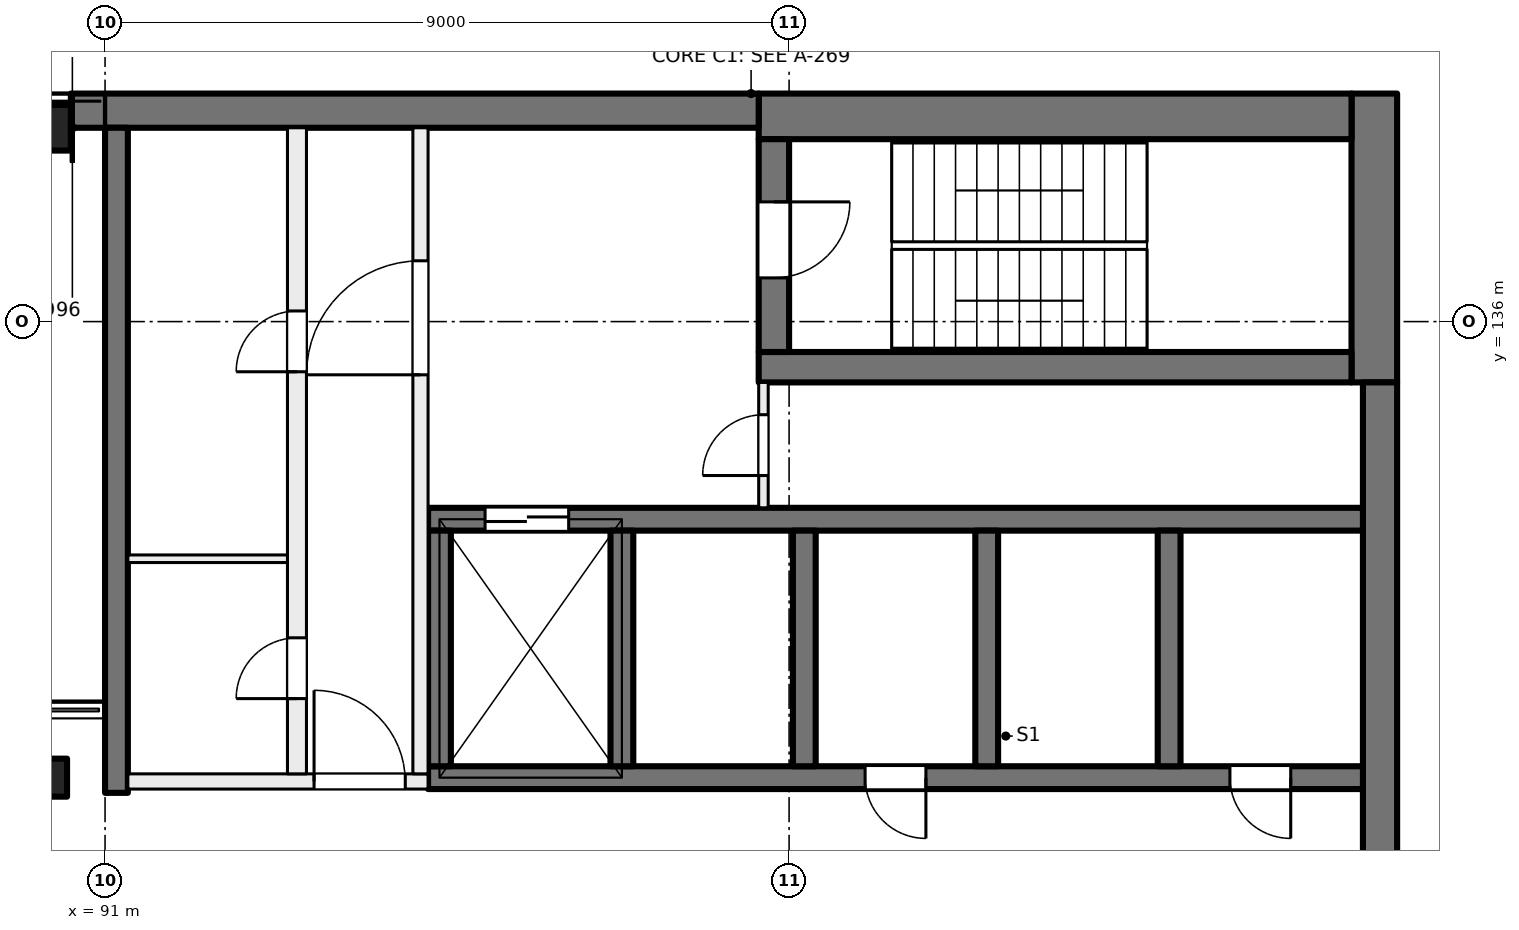
"""IFC4 building model, lengths in metres.
Left out: names, types, materials, properties, quantities, classifications, styles, units other than length and angle.
Written with IfcOpenShell. Run it as: python <this file> out.ifc"""

import sys

from ifc_helpers import new_model, si_unit, direction, frame, frame_2d, origin, origin_2d, place, context, subcontext, project, spatial, rectangle, extrude, element, fill, save


model = new_model("IFC4")
c1 = context("Model", 3, precision=1e-05, world=origin(), true_north=direction((0.0, 1.0)))
c2 = subcontext(c1, "Body", "Model", "MODEL_VIEW")
j1 = project(units=[si_unit("LENGTHUNIT", "METRE"), si_unit("PLANEANGLEUNIT", "RADIAN")], contexts=[c1])
p1 = place(None, origin())
s1 = spatial("IfcSite", under=j1, at=p1, CompositionType="ELEMENT")
p2 = place(p1, origin())
s2 = spatial("IfcBuilding", under=s1, at=p2, CompositionType="ELEMENT")
p3 = place(p2, frame((0.0, 0.0, 277.5)))
s3 = spatial("IfcBuildingStorey", under=s2, at=p3, CompositionType="ELEMENT", Elevation=277.5)
p4 = place(p3, frame((90.25, 130.0, 0.0), z_axis=(0.0, 0.0, 1.0), x_axis=(1.0, 0.0, 0.0)))
e1 = element("IfcColumn", 1, at=p4, inside=s3, PredefinedType="COLUMN", context=c2, shape_type="SweptSolid", body=[
    extrude(rectangle(XDim=0.5, YDim=0.5, at=origin_2d()), origin(), (0.0, 0.0, 1.0), 4.5),
])
p5 = place(p3, frame((90.25, 138.55, 0.0), z_axis=(0.0, 0.0, 1.0), x_axis=(1.0, 0.0, 0.0)))
e2 = element("IfcColumn", 2, at=p5, inside=s3, PredefinedType="COLUMN", context=c2, shape_type="SweptSolid", body=[
    extrude(rectangle(XDim=0.6, YDim=0.6, at=origin_2d()), origin(), (0.0, 0.0, 1.0), 4.5),
])
p6 = place(p3, frame((107.7, 139.0, 0.0), z_axis=(0.0, 0.0, 1.0), x_axis=(0.0, -1.0, 0.0)))
e3 = element("IfcWall", 3, at=p6, inside=s3, PredefinedType="SHEAR", context=c2, shape_type="SweptSolid", body=[
    extrude(rectangle(XDim=3.8, YDim=0.6, at=frame_2d((1.9, 0.0))), origin(), (0.0, 0.0, 1.0), 4.5),
])
p7 = place(p3, frame((107.775, 135.2, 0.0), z_axis=(0.0, 0.0, 1.0), x_axis=(0.0, -1.0, 0.0)))
e4 = element("IfcWall", 4, at=p7, inside=s3, PredefinedType="SHEAR", context=c2, shape_type="SweptSolid", body=[
    extrude(rectangle(XDim=14.4, YDim=0.45, at=frame_2d((7.2, 0.0))), origin(), (0.0, 0.0, 1.0), 4.5),
])
p8 = place(p3, frame((107.4, 138.7, 0.0), z_axis=(0.0, 0.0, 1.0), x_axis=(-1.0, 0.0, 0.0)))
e5 = element("IfcWall", 5, at=p8, inside=s3, PredefinedType="SHEAR", context=c2, shape_type="SweptSolid", body=[
    extrude(rectangle(XDim=7.8, YDim=0.6, at=frame_2d((3.9, 0.0))), origin(), (0.0, 0.0, 1.0), 4.5),
])
p9 = place(p3, frame((99.6, 138.775, 0.0), z_axis=(0.0, 0.0, 1.0), x_axis=(-1.0, 0.0, 0.0)))
e6 = element("IfcWall", 6, at=p9, inside=s3, PredefinedType="SHEAR", context=c2, shape_type="SweptSolid", body=[
    extrude(rectangle(XDim=9.05, YDim=0.45, at=frame_2d((4.525, 0.0))), origin(), (0.0, 0.0, 1.0), 4.5),
])
p10 = place(p3, frame((107.4, 135.4, 0.0), z_axis=(0.0, 0.0, 1.0), x_axis=(-1.0, 0.0, 0.0)))
e7 = element("IfcWall", 7, at=p10, inside=s3, PredefinedType="SHEAR", context=c2, shape_type="SweptSolid", body=[
    extrude(rectangle(XDim=7.8, YDim=0.4, at=frame_2d((3.9, 0.0))), origin(), (0.0, 0.0, 1.0), 4.5),
])
p11 = place(p3, frame((99.8, 138.4, 0.0), z_axis=(0.0, 0.0, 1.0), x_axis=(0.0, -1.0, 0.0)))
e8 = element("IfcWall", 8, at=p11, inside=s3, PredefinedType="SHEAR", context=c2, shape_type="SweptSolid", body=[
    extrude(rectangle(XDim=2.8, YDim=0.4, at=frame_2d((1.4, 0.0))), origin(), (0.0, 0.0, 1.0), 4.5),
])
p12 = place(p11, frame((0.825, 0.0, 0.0)))
e9 = element("IfcOpeningElement", 9, at=p12, cuts=e8, PredefinedType="OPENING", context=c2, shape_type="SweptSolid", body=[
    extrude(rectangle(XDim=1.0, YDim=2.1, at=frame_2d((0.5, 1.05))), frame((0.0, 0.21, 0.0), z_axis=(0.0, -1.0, 0.0), x_axis=(1.0, 0.0, 0.0)), (0.0, 0.0, 1.0), 0.42),
])
p13 = place(p3, frame((107.55, 130.0, 0.0), z_axis=(0.0, 0.0, 1.0), x_axis=(-1.0, 0.0, 0.0)))
e10 = element("IfcWall", 10, at=p13, inside=s3, PredefinedType="SHEAR", context=c2, shape_type="SweptSolid", body=[
    extrude(rectangle(XDim=12.3, YDim=0.3, at=frame_2d((6.15, 0.0))), origin(), (0.0, 0.0, 1.0), 4.5),
])
p14 = place(p13, frame((0.95, 0.0, 0.0)))
e11 = element("IfcOpeningElement", 11, at=p14, cuts=e10, PredefinedType="OPENING", context=c2, shape_type="SweptSolid", body=[
    extrude(rectangle(XDim=0.8, YDim=2.1, at=frame_2d((0.4, 1.05))), frame((0.0, 0.16, 0.0), z_axis=(0.0, -1.0, 0.0), x_axis=(1.0, 0.0, 0.0)), (0.0, 0.0, 1.0), 0.32),
])
p15 = place(p13, frame((5.75, 0.0, 0.0)))
e12 = element("IfcOpeningElement", 12, at=p15, cuts=e10, PredefinedType="OPENING", context=c2, shape_type="SweptSolid", body=[
    extrude(rectangle(XDim=0.8, YDim=2.1, at=frame_2d((0.4, 1.05))), frame((0.0, 0.16, 0.0), z_axis=(0.0, -1.0, 0.0), x_axis=(1.0, 0.0, 0.0)), (0.0, 0.0, 1.0), 0.32),
])
p16 = place(p3, frame((107.55, 133.4, 0.0), z_axis=(0.0, 0.0, 1.0), x_axis=(-1.0, 0.0, 0.0)))
e13 = element("IfcWall", 13, at=p16, inside=s3, PredefinedType="SHEAR", context=c2, shape_type="SweptSolid", body=[
    extrude(rectangle(XDim=12.3, YDim=0.3, at=frame_2d((6.15, 0.0))), origin(), (0.0, 0.0, 1.0), 4.5),
])
p17 = place(p16, frame((10.45, 0.0, 0.0)))
e14 = element("IfcOpeningElement", 14, at=p17, cuts=e13, PredefinedType="OPENING", context=c2, shape_type="SweptSolid", body=[
    extrude(rectangle(XDim=1.1, YDim=2.1, at=frame_2d((0.55, 1.05))), frame((0.0, 0.16, 0.0), z_axis=(0.0, -1.0, 0.0), x_axis=(1.0, 0.0, 0.0)), (0.0, 0.0, 1.0), 0.32),
])
for number, where, z_axis, x_axis in (
    (15, (105.0, 133.25, 0.0), (0.0, 0.0, 1.0), (0.0, -1.0, 0.0)),
    (16, (102.6, 133.25, 0.0), (0.0, 0.0, 1.0), (0.0, -1.0, 0.0)),
    (17, (100.2, 133.25, 0.0), (0.0, 0.0, 1.0), (0.0, -1.0, 0.0)),
    (18, (97.8, 133.25, 0.0), (0.0, 0.0, 1.0), (0.0, -1.0, 0.0)),
    (19, (95.4, 133.25, 0.0), (0.0, 0.0, 1.0), (0.0, -1.0, 0.0)),
):
    element("IfcWall", number, at=place(p3, frame(where, z_axis=z_axis, x_axis=x_axis)), inside=s3, PredefinedType="SHEAR", context=c2, shape_type="SweptSolid", body=[
        extrude(rectangle(XDim=3.1, YDim=0.3, at=frame_2d((1.55, 0.0))), origin(), (0.0, 0.0, 1.0), 4.5),
    ])
p18 = place(p3, frame((91.15, 138.55, 0.0), z_axis=(0.0, 0.0, 1.0), x_axis=(0.0, -1.0, 0.0)))
e20 = element("IfcWall", 20, at=p18, inside=s3, PredefinedType="SHEAR", context=c2, shape_type="SweptSolid", body=[
    extrude(rectangle(XDim=8.75, YDim=0.3, at=frame_2d((4.375, 0.0))), origin(), (0.0, 0.0, 1.0), 4.5),
])
p19 = place(p3, frame((91.3, 129.95, 0.0), z_axis=(0.0, 0.0, 1.0), x_axis=(1.0, 0.0, 0.0)))
e21 = element("IfcWall", 21, at=p19, inside=s3, PredefinedType="PARTITIONING", context=c2, shape_type="SweptSolid", body=[
    extrude(rectangle(XDim=3.95, YDim=0.2, at=frame_2d((1.975, 0.0))), origin(), (0.0, 0.0, 1.0), 4.125),
])
p20 = place(p19, frame((2.45, 0.0, 0.0)))
e22 = element("IfcOpeningElement", 22, at=p20, cuts=e21, PredefinedType="OPENING", context=c2, shape_type="SweptSolid", body=[
    extrude(rectangle(XDim=1.2, YDim=2.1, at=frame_2d((0.6, 1.05))), frame((0.0, 0.11, 0.0), z_axis=(0.0, -1.0, 0.0), x_axis=(1.0, 0.0, 0.0)), (0.0, 0.0, 1.0), 0.22),
])
p21 = place(p3, frame((95.15, 130.05, 0.0), z_axis=(0.0, 0.0, 1.0), x_axis=(0.0, 1.0, 0.0)))
e23 = element("IfcWall", 23, at=p21, inside=s3, PredefinedType="PARTITIONING", context=c2, shape_type="SweptSolid", body=[
    extrude(rectangle(XDim=8.5, YDim=0.2, at=frame_2d((4.25, 0.0))), origin(), (0.0, 0.0, 1.0), 4.125),
])
p22 = place(p21, frame((5.25, 0.0, 0.0)))
e24 = element("IfcOpeningElement", 24, at=p22, cuts=e23, PredefinedType="OPENING", context=c2, shape_type="SweptSolid", body=[
    extrude(rectangle(XDim=1.5, YDim=2.1, at=frame_2d((0.75, 1.05))), frame((0.0, 0.11, 0.0), z_axis=(0.0, -1.0, 0.0), x_axis=(1.0, 0.0, 0.0)), (0.0, 0.0, 1.0), 0.22),
])
p23 = place(p3, frame((93.525, 130.05, 0.0), z_axis=(0.0, 0.0, 1.0), x_axis=(0.0, 1.0, 0.0)))
e25 = element("IfcWall", 25, at=p23, inside=s3, PredefinedType="PARTITIONING", context=c2, shape_type="SweptSolid", body=[
    extrude(rectangle(XDim=8.5, YDim=0.25, at=frame_2d((4.25, 0.0))), origin(), (0.0, 0.0, 1.0), 4.125),
])
p24 = place(p23, frame((0.99, 0.0, 0.0)))
e26 = element("IfcOpeningElement", 26, at=p24, cuts=e25, PredefinedType="OPENING", context=c2, shape_type="SweptSolid", body=[
    extrude(rectangle(XDim=0.8, YDim=2.1, at=frame_2d((0.4, 1.05))), frame((0.0, 0.135, 0.0), z_axis=(0.0, -1.0, 0.0), x_axis=(1.0, 0.0, 0.0)), (0.0, 0.0, 1.0), 0.27),
])
p25 = place(p23, frame((5.29, 0.0, 0.0)))
e27 = element("IfcOpeningElement", 27, at=p25, cuts=e25, PredefinedType="OPENING", context=c2, shape_type="SweptSolid", body=[
    extrude(rectangle(XDim=0.8, YDim=2.1, at=frame_2d((0.4, 1.05))), frame((0.0, 0.135, 0.0), z_axis=(0.0, -1.0, 0.0), x_axis=(1.0, 0.0, 0.0)), (0.0, 0.0, 1.0), 0.27),
])
p26 = place(p3, frame((99.663, 133.55, 0.0), z_axis=(0.0, 0.0, 1.0), x_axis=(0.0, 1.0, 0.0)))
e28 = element("IfcWall", 28, at=p26, inside=s3, PredefinedType="PARTITIONING", context=c2, shape_type="SweptSolid", body=[
    extrude(rectangle(XDim=1.65, YDim=0.125, at=frame_2d((0.825, 0.0))), origin(), (0.0, 0.0, 1.0), 4.125),
])
p27 = place(p26, frame((0.425, 0.0, 0.0)))
e29 = element("IfcOpeningElement", 29, at=p27, cuts=e28, PredefinedType="OPENING", context=c2, shape_type="SweptSolid", body=[
    extrude(rectangle(XDim=0.8, YDim=2.1, at=frame_2d((0.4, 1.05))), frame((0.0, 0.073, 0.0), z_axis=(0.0, -1.0, 0.0), x_axis=(1.0, 0.0, 0.0)), (0.0, 0.0, 1.0), 0.145),
])
p28 = place(p3, frame((91.3, 132.88, 0.0), z_axis=(0.0, 0.0, 1.0), x_axis=(1.0, 0.0, 0.0)))
e30 = element("IfcWall", 30, at=p28, inside=s3, PredefinedType="PARTITIONING", context=c2, shape_type="SweptSolid", body=[
    extrude(rectangle(XDim=2.1, YDim=0.1, at=frame_2d((1.05, 0.0))), origin(), (0.0, 0.0, 1.0), 4.125),
])
p29 = place(p14, origin())
e31 = element("IfcDoor", 31, at=p29, inside=s3, OperationType="SINGLE_SWING_LEFT", PredefinedType="DOOR", context=c2, shape_type="SweptSolid", body=[
    extrude(rectangle(XDim=0.8, YDim=2.1, at=frame_2d((0.4, 1.05))), frame((0.0, 0.025, 0.0), z_axis=(0.0, -1.0, 0.0), x_axis=(1.0, 0.0, 0.0)), (0.0, 0.0, 1.0), 0.05),
])
fill(e11, e31)
p30 = place(p15, origin())
e32 = element("IfcDoor", 32, at=p30, inside=s3, OperationType="SINGLE_SWING_RIGHT", PredefinedType="DOOR", context=c2, shape_type="SweptSolid", body=[
    extrude(rectangle(XDim=0.8, YDim=2.1, at=frame_2d((0.4, 1.05))), frame((0.0, 0.025, 0.0), z_axis=(0.0, -1.0, 0.0), x_axis=(1.0, 0.0, 0.0)), (0.0, 0.0, 1.0), 0.05),
])
fill(e12, e32)
p31 = place(p20, origin())
e33 = element("IfcDoor", 33, at=p31, inside=s3, OperationType="DOUBLE_DOOR_SINGLE_SWING", PredefinedType="DOOR", context=c2, shape_type="SweptSolid", body=[
    extrude(rectangle(XDim=1.2, YDim=2.1, at=frame_2d((0.6, 1.05))), frame((0.0, 0.025, 0.0), z_axis=(0.0, -1.0, 0.0), x_axis=(1.0, 0.0, 0.0)), (0.0, 0.0, 1.0), 0.05),
])
fill(e22, e33)
p32 = place(p22, origin())
e34 = element("IfcDoor", 34, at=p32, inside=s3, OperationType="DOUBLE_DOOR_SINGLE_SWING", PredefinedType="DOOR", context=c2, shape_type="SweptSolid", body=[
    extrude(rectangle(XDim=1.5, YDim=2.1, at=frame_2d((0.75, 1.05))), frame((0.0, 0.025, 0.0), z_axis=(0.0, -1.0, 0.0), x_axis=(1.0, 0.0, 0.0)), (0.0, 0.0, 1.0), 0.05),
])
fill(e24, e34)
p33 = place(p12, origin())
e35 = element("IfcDoor", 35, at=p33, inside=s3, OperationType="SINGLE_SWING_RIGHT", PredefinedType="DOOR", context=c2, shape_type="SweptSolid", body=[
    extrude(rectangle(XDim=1.0, YDim=2.1, at=frame_2d((0.5, 1.05))), frame((0.0, 0.025, 0.0), z_axis=(0.0, -1.0, 0.0), x_axis=(1.0, 0.0, 0.0)), (0.0, 0.0, 1.0), 0.05),
])
fill(e9, e35)
p34 = place(p27, origin())
e36 = element("IfcDoor", 36, at=p34, inside=s3, OperationType="SINGLE_SWING_LEFT", PredefinedType="DOOR", context=c2, shape_type="SweptSolid", body=[
    extrude(rectangle(XDim=0.8, YDim=2.1, at=frame_2d((0.4, 1.05))), frame((0.0, 0.025, 0.0), z_axis=(0.0, -1.0, 0.0), x_axis=(1.0, 0.0, 0.0)), (0.0, 0.0, 1.0), 0.05),
])
fill(e29, e36)
p35 = place(p24, origin())
e37 = element("IfcDoor", 37, at=p35, inside=s3, OperationType="SINGLE_SWING_RIGHT", PredefinedType="DOOR", context=c2, shape_type="SweptSolid", body=[
    extrude(rectangle(XDim=0.8, YDim=2.1, at=frame_2d((0.4, 1.05))), frame((0.0, 0.025, 0.0), z_axis=(0.0, -1.0, 0.0), x_axis=(1.0, 0.0, 0.0)), (0.0, 0.0, 1.0), 0.05),
])
fill(e26, e37)
p36 = place(p25, origin())
e38 = element("IfcDoor", 38, at=p36, inside=s3, OperationType="SINGLE_SWING_LEFT", PredefinedType="DOOR", context=c2, shape_type="SweptSolid", body=[
    extrude(rectangle(XDim=0.8, YDim=2.1, at=frame_2d((0.4, 1.05))), frame((0.0, 0.025, 0.0), z_axis=(0.0, -1.0, 0.0), x_axis=(1.0, 0.0, 0.0)), (0.0, 0.0, 1.0), 0.05),
])
fill(e27, e38)
p37 = place(p17, origin())
e39 = element("IfcDoor", 39, at=p37, inside=s3, OperationType="DOUBLE_DOOR_SLIDING", PredefinedType="DOOR", context=c2, shape_type="SweptSolid", body=[
    extrude(rectangle(XDim=1.1, YDim=2.1, at=frame_2d((0.55, 1.05))), frame((0.0, 0.025, 0.0), z_axis=(0.0, -1.0, 0.0), x_axis=(1.0, 0.0, 0.0)), (0.0, 0.0, 1.0), 0.05),
])
fill(e14, e39)
save(model, sys.argv[1])
